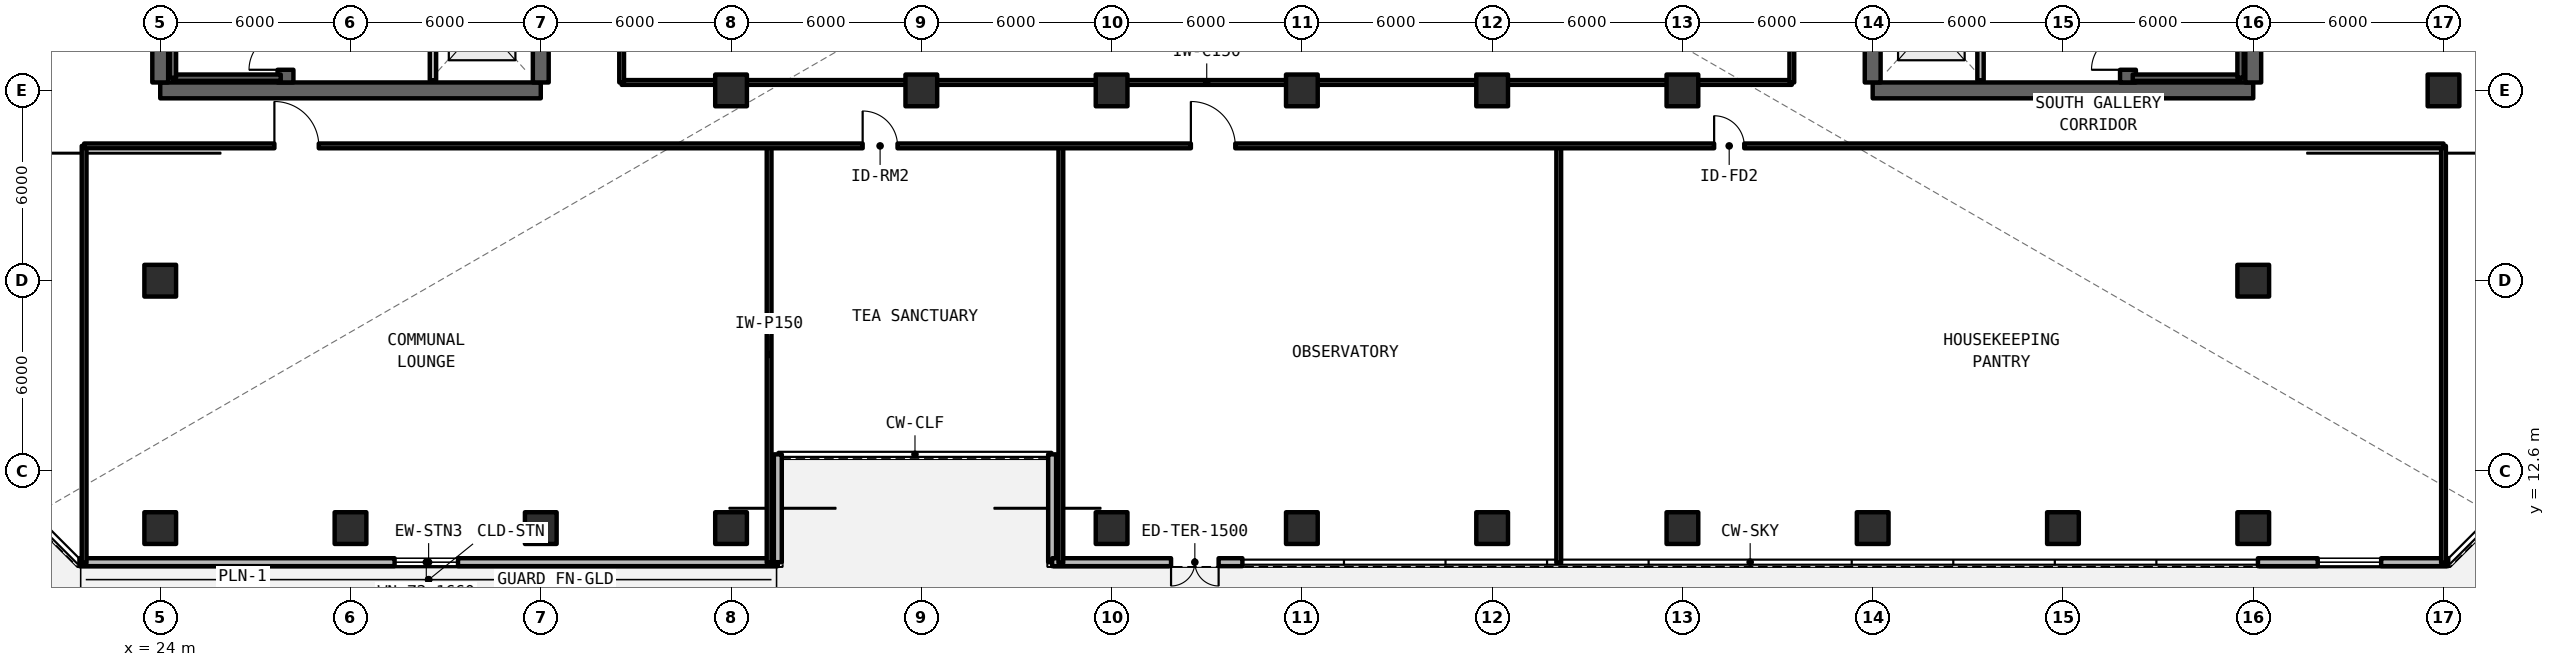
"""IFC4 building model, lengths in metres.
Left out: names, types, materials, properties, quantities, classifications, styles, units other than length and angle.
Written with IfcOpenShell. Run it as: python <this file> out.ifc"""

import sys

from ifc_helpers import new_model, si_unit, direction, frame, frame_2d, origin, origin_2d, place, context, subcontext, project, spatial, rectangle, extrude, element, fill, save


model = new_model("IFC4")
c1 = context("Model", 3, precision=1e-05, world=origin(), true_north=direction((0.0, 1.0)))
c2 = subcontext(c1, "Body", "Model", "MODEL_VIEW")
j1 = project(units=[si_unit("LENGTHUNIT", "METRE"), si_unit("PLANEANGLEUNIT", "RADIAN")], contexts=[c1])
p1 = place(None, origin())
s1 = spatial("IfcSite", under=j1, at=p1, CompositionType="ELEMENT")
p2 = place(p1, origin())
s2 = spatial("IfcBuilding", under=s1, at=p2, CompositionType="ELEMENT")
p3 = place(p2, frame((0.0, 0.0, 78.21)))
s3 = spatial("IfcBuildingStorey", under=s2, at=p3, CompositionType="ELEMENT", Elevation=78.21)
p4 = place(p3, frame((24.0, 24.6, 0.0), z_axis=(0.0, 0.0, 1.0), x_axis=(1.0, 0.0, 0.0)))
e1 = element("IfcWall", 1, at=p4, inside=s3, PredefinedType="SHEAR", context=c2, shape_type="SweptSolid", body=[
    extrude(rectangle(XDim=12.0, YDim=0.5, at=frame_2d((6.0, 0.0))), origin(), (0.0, 0.0, 1.0), 3.96),
])
p5 = place(p3, frame((24.0, 24.85, 0.0), z_axis=(0.0, 0.0, 1.0), x_axis=(0.0, 1.0, 0.0)))
e2 = element("IfcWall", 2, at=p5, inside=s3, PredefinedType="SHEAR", context=c2, shape_type="SweptSolid", body=[
    extrude(rectangle(XDim=17.5, YDim=0.5, at=frame_2d((8.75, 0.0))), origin(), (0.0, 0.0, 1.0), 3.96),
])
p6 = place(p3, frame((36.0, 24.85, 0.0), z_axis=(0.0, 0.0, 1.0), x_axis=(0.0, 1.0, 0.0)))
e3 = element("IfcWall", 3, at=p6, inside=s3, PredefinedType="SHEAR", context=c2, shape_type="SweptSolid", body=[
    extrude(rectangle(XDim=8.95, YDim=0.5, at=frame_2d((4.475, 0.0))), origin(), (0.0, 0.0, 1.0), 3.96),
])
p7 = place(p3, frame((27.95, 24.85, 0.0), z_axis=(0.0, 0.0, 1.0), x_axis=(0.0, 1.0, 0.0)))
e4 = element("IfcWall", 4, at=p7, inside=s3, PredefinedType="SHEAR", context=c2, shape_type="SweptSolid", body=[
    extrude(rectangle(XDim=17.5, YDim=0.5, at=frame_2d((8.75, 0.0))), origin(), (0.0, 0.0, 1.0), 3.96),
])
p8 = place(p7, frame((0.4, 0.0, 0.0)))
e5 = element("IfcOpeningElement", 5, at=p8, cuts=e4, PredefinedType="OPENING", context=c2, shape_type="SweptSolid", body=[
    extrude(rectangle(XDim=1.15, YDim=2.15, at=frame_2d((0.575, 1.075))), frame((0.0, 0.26, 0.0), z_axis=(0.0, -1.0, 0.0), x_axis=(1.0, 0.0, 0.0)), (0.0, 0.0, 1.0), 0.52),
])
p9 = place(p7, frame((9.6, 0.0, 0.0)))
e6 = element("IfcOpeningElement", 6, at=p9, cuts=e4, PredefinedType="OPENING", context=c2, shape_type="SweptSolid", body=[
    extrude(rectangle(XDim=1.15, YDim=2.15, at=frame_2d((0.575, 1.075))), frame((0.0, 0.26, 0.0), z_axis=(0.0, -1.0, 0.0), x_axis=(1.0, 0.0, 0.0)), (0.0, 0.0, 1.0), 0.52),
])
p10 = place(p3, frame((78.0, 24.6, 0.0), z_axis=(0.0, 0.0, 1.0), x_axis=(1.0, 0.0, 0.0)))
e7 = element("IfcWall", 7, at=p10, inside=s3, PredefinedType="SHEAR", context=c2, shape_type="SweptSolid", body=[
    extrude(rectangle(XDim=12.0, YDim=0.5, at=frame_2d((6.0, 0.0))), origin(), (0.0, 0.0, 1.0), 3.96),
])
p11 = place(p3, frame((90.0, 24.85, 0.0), z_axis=(0.0, 0.0, 1.0), x_axis=(0.0, 1.0, 0.0)))
e8 = element("IfcWall", 8, at=p11, inside=s3, PredefinedType="SHEAR", context=c2, shape_type="SweptSolid", body=[
    extrude(rectangle(XDim=17.5, YDim=0.5, at=frame_2d((8.75, 0.0))), origin(), (0.0, 0.0, 1.0), 3.96),
])
p12 = place(p3, frame((78.0, 24.85, 0.0), z_axis=(0.0, 0.0, 1.0), x_axis=(0.0, 1.0, 0.0)))
e9 = element("IfcWall", 9, at=p12, inside=s3, PredefinedType="SHEAR", context=c2, shape_type="SweptSolid", body=[
    extrude(rectangle(XDim=8.95, YDim=0.5, at=frame_2d((4.475, 0.0))), origin(), (0.0, 0.0, 1.0), 3.96),
])
p13 = place(p3, frame((86.05, 24.85, 0.0), z_axis=(0.0, 0.0, 1.0), x_axis=(0.0, 1.0, 0.0)))
e10 = element("IfcWall", 10, at=p13, inside=s3, PredefinedType="SHEAR", context=c2, shape_type="SweptSolid", body=[
    extrude(rectangle(XDim=17.5, YDim=0.5, at=frame_2d((8.75, 0.0))), origin(), (0.0, 0.0, 1.0), 3.96),
])
p14 = place(p13, frame((0.4, 0.0, 0.0)))
e11 = element("IfcOpeningElement", 11, at=p14, cuts=e10, PredefinedType="OPENING", context=c2, shape_type="SweptSolid", body=[
    extrude(rectangle(XDim=1.15, YDim=2.15, at=frame_2d((0.575, 1.075))), frame((0.0, 0.26, 0.0), z_axis=(0.0, -1.0, 0.0), x_axis=(1.0, 0.0, 0.0)), (0.0, 0.0, 1.0), 0.52),
])
p15 = place(p13, frame((9.6, 0.0, 0.0)))
e12 = element("IfcOpeningElement", 12, at=p15, cuts=e10, PredefinedType="OPENING", context=c2, shape_type="SweptSolid", body=[
    extrude(rectangle(XDim=1.15, YDim=2.15, at=frame_2d((0.575, 1.075))), frame((0.0, 0.26, 0.0), z_axis=(0.0, -1.0, 0.0), x_axis=(1.0, 0.0, 0.0)), (0.0, 0.0, 1.0), 0.52),
])
for number, where, z_axis, x_axis in (
    (13, (42.0, 24.6, 0.0), (0.0, 0.0, 1.0), (1.0, 0.0, 0.0)),
    (14, (48.0, 24.6, 0.0), (0.0, 0.0, 1.0), (1.0, 0.0, 0.0)),
    (15, (54.0, 24.6, 0.0), (0.0, 0.0, 1.0), (1.0, 0.0, 0.0)),
    (16, (60.0, 24.6, 0.0), (0.0, 0.0, 1.0), (1.0, 0.0, 0.0)),
    (17, (66.0, 24.6, 0.0), (0.0, 0.0, 1.0), (1.0, 0.0, 0.0)),
    (18, (72.0, 24.6, 0.0), (0.0, 0.0, 1.0), (1.0, 0.0, 0.0)),
    (19, (96.0, 24.6, 0.0), (0.0, 0.0, 1.0), (1.0, 0.0, 0.0)),
    (20, (24.0, 18.6, 0.0), (0.0, 0.0, 1.0), (1.0, 0.0, 0.0)),
    (21, (90.0, 18.6, 0.0), (0.0, 0.0, 1.0), (1.0, 0.0, 0.0)),
):
    element("IfcColumn", number, at=place(p3, frame(where, z_axis=z_axis, x_axis=x_axis)), inside=s3, PredefinedType="COLUMN", context=c2, shape_type="SweptSolid", body=[
        extrude(rectangle(XDim=1.0, YDim=1.0, at=origin_2d()), origin(), (0.0, 0.0, 1.0), 3.96),
    ])
for number, where, z_axis, x_axis in (
    (22, (24.0, 10.8, -0.28), (0.0, 0.0, 1.0), (1.0, 0.0, 0.0)),
    (23, (30.0, 10.8, -0.28), (0.0, 0.0, 1.0), (1.0, 0.0, 0.0)),
    (24, (36.0, 10.8, -0.28), (0.0, 0.0, 1.0), (1.0, 0.0, 0.0)),
    (25, (42.0, 10.8, -0.28), (0.0, 0.0, 1.0), (1.0, 0.0, 0.0)),
    (26, (54.0, 10.8, -0.28), (0.0, 0.0, 1.0), (1.0, 0.0, 0.0)),
    (27, (60.0, 10.8, -0.28), (0.0, 0.0, 1.0), (1.0, 0.0, 0.0)),
    (28, (66.0, 10.8, -0.28), (0.0, 0.0, 1.0), (1.0, 0.0, 0.0)),
    (29, (72.0, 10.8, -0.28), (0.0, 0.0, 1.0), (1.0, 0.0, 0.0)),
    (30, (78.0, 10.8, -0.28), (0.0, 0.0, 1.0), (1.0, 0.0, 0.0)),
    (31, (84.0, 10.8, -0.28), (0.0, 0.0, 1.0), (1.0, 0.0, 0.0)),
    (32, (90.0, 10.8, -0.28), (0.0, 0.0, 1.0), (1.0, 0.0, 0.0)),
):
    element("IfcColumn", number, at=place(p3, frame(where, z_axis=z_axis, x_axis=x_axis)), inside=s3, PredefinedType="COLUMN", context=c2, shape_type="SweptSolid", body=[
        extrude(rectangle(XDim=1.0, YDim=1.0, at=origin_2d()), origin(), (0.0, 0.0, 1.0), 4.24),
    ])
p16 = place(p3, frame((21.452, 9.725, 0.0), z_axis=(0.0, 0.0, 1.0), x_axis=(1.0, 0.0, 0.0)))
e33 = element("IfcWall", 33, at=p16, inside=s3, PredefinedType="SOLIDWALL", context=c2, shape_type="SweptSolid", body=[
    extrude(rectangle(XDim=22.023, YDim=0.25, at=frame_2d((11.012, 0.0))), origin(), (0.0, 0.0, 1.0), 3.74),
])
p17 = place(p16, frame((9.938, 0.0, 0.78)))
e34 = element("IfcOpeningElement", 34, at=p17, cuts=e33, PredefinedType="OPENING", context=c2, shape_type="SweptSolid", body=[
    extrude(rectangle(XDim=2.0, YDim=1.66, at=frame_2d((1.0, 0.83))), frame((0.0, 0.135, 0.0), z_axis=(0.0, -1.0, 0.0), x_axis=(1.0, 0.0, 0.0)), (0.0, 0.0, 1.0), 0.27),
])
for number, where, z_axis, x_axis in (
    (35, (43.475, 9.725, 0.0), (0.0, 0.0, 1.0), (0.0, 1.0, 0.0)),
    (36, (52.125, 13.125, 0.0), (0.0, 0.0, 1.0), (0.0, -1.0, 0.0)),
):
    element("IfcWall", number, at=place(p3, frame(where, z_axis=z_axis, x_axis=x_axis)), inside=s3, PredefinedType="SOLIDWALL", context=c2, shape_type="SweptSolid", body=[
        extrude(rectangle(XDim=3.4, YDim=0.25, at=frame_2d((1.7, 0.0))), origin(), (0.0, 0.0, 1.0), 3.74),
    ])
p18 = place(p3, frame((52.125, 9.725, 0.0), z_axis=(0.0, 0.0, 1.0), x_axis=(1.0, 0.0, 0.0)))
e37 = element("IfcWall", 37, at=p18, inside=s3, PredefinedType="SOLIDWALL", context=c2, shape_type="SweptSolid", body=[
    extrude(rectangle(XDim=6.0, YDim=0.25, at=frame_2d((3.0, 0.0))), origin(), (0.0, 0.0, 1.0), 3.74),
])
p19 = place(p18, frame((3.75, 0.0, 0.0)))
e38 = element("IfcOpeningElement", 38, at=p19, cuts=e37, PredefinedType="OPENING", context=c2, shape_type="SweptSolid", body=[
    extrude(rectangle(XDim=1.5, YDim=2.2, at=frame_2d((0.75, 1.1))), frame((0.0, 0.135, 0.0), z_axis=(0.0, -1.0, 0.0), x_axis=(1.0, 0.0, 0.0)), (0.0, 0.0, 1.0), 0.27),
])
p20 = place(p3, frame((90.148, 9.725, 0.0), z_axis=(0.0, 0.0, 1.0), x_axis=(1.0, 0.0, 0.0)))
e39 = element("IfcWall", 39, at=p20, inside=s3, PredefinedType="SOLIDWALL", context=c2, shape_type="SweptSolid", body=[
    extrude(rectangle(XDim=6.0, YDim=0.25, at=frame_2d((3.0, 0.0))), origin(), (0.0, 0.0, 1.0), 3.74),
])
p21 = place(p20, frame((1.886, 0.0, 0.78)))
e40 = element("IfcOpeningElement", 40, at=p21, cuts=e39, PredefinedType="OPENING", context=c2, shape_type="SweptSolid", body=[
    extrude(rectangle(XDim=2.0, YDim=1.66, at=frame_2d((1.0, 0.83))), frame((0.0, 0.135, 0.0), z_axis=(0.0, -1.0, 0.0), x_axis=(1.0, 0.0, 0.0)), (0.0, 0.0, 1.0), 0.27),
])
p22 = place(p3, frame((32.6, 24.92, 0.0), z_axis=(0.0, 0.0, 1.0), x_axis=(0.0, 1.0, 0.0)))
e41 = element("IfcWall", 41, at=p22, inside=s3, PredefinedType="SOLIDWALL", context=c2, shape_type="SweptSolid", body=[
    extrude(rectangle(XDim=3.58, YDim=0.2, at=frame_2d((1.79, 0.0))), origin(), (0.0, 0.0, 1.0), 2.96),
])
p23 = place(p22, frame((1.3, 0.0, 0.0)))
e42 = element("IfcOpeningElement", 42, at=p23, cuts=e41, PredefinedType="OPENING", context=c2, shape_type="SweptSolid", body=[
    extrude(rectangle(XDim=1.1, YDim=2.2, at=frame_2d((0.55, 1.1))), frame((0.0, 0.11, 0.0), z_axis=(0.0, -1.0, 0.0), x_axis=(1.0, 0.0, 0.0)), (0.0, 0.0, 1.0), 0.22),
])
p24 = place(p3, frame((81.4, 24.92, 0.0), z_axis=(0.0, 0.0, 1.0), x_axis=(0.0, 1.0, 0.0)))
e43 = element("IfcWall", 43, at=p24, inside=s3, PredefinedType="SOLIDWALL", context=c2, shape_type="SweptSolid", body=[
    extrude(rectangle(XDim=3.58, YDim=0.2, at=frame_2d((1.79, 0.0))), origin(), (0.0, 0.0, 1.0), 2.96),
])
p25 = place(p24, frame((1.3, 0.0, 0.0)))
e44 = element("IfcOpeningElement", 44, at=p25, cuts=e43, PredefinedType="OPENING", context=c2, shape_type="SweptSolid", body=[
    extrude(rectangle(XDim=1.1, YDim=2.2, at=frame_2d((0.55, 1.1))), frame((0.0, 0.11, 0.0), z_axis=(0.0, -1.0, 0.0), x_axis=(1.0, 0.0, 0.0)), (0.0, 0.0, 1.0), 0.22),
])
p26 = place(p3, frame((38.55, 24.85, 0.0), z_axis=(0.0, 0.0, 1.0), x_axis=(1.0, 0.0, 0.0)))
e45 = element("IfcWall", 45, at=p26, inside=s3, PredefinedType="SOLIDWALL", context=c2, shape_type="SweptSolid", body=[
    extrude(rectangle(XDim=36.9, YDim=0.15, at=frame_2d((18.45, 0.0))), origin(), (0.0, 0.0, 1.0), 2.96),
])
p27 = place(p3, frame((38.55, 24.85, 0.0), z_axis=(0.0, 0.0, 1.0), x_axis=(0.0, 1.0, 0.0)))
e46 = element("IfcWall", 46, at=p27, inside=s3, PredefinedType="SOLIDWALL", context=c2, shape_type="SweptSolid", body=[
    extrude(rectangle(XDim=17.5, YDim=0.15, at=frame_2d((8.75, 0.0))), origin(), (0.0, 0.0, 1.0), 2.96),
])
p28 = place(p27, frame((7.8, 0.0, 0.0)))
e47 = element("IfcOpeningElement", 47, at=p28, cuts=e46, PredefinedType="OPENING", context=c2, shape_type="SweptSolid", body=[
    extrude(rectangle(XDim=1.4, YDim=2.15, at=frame_2d((0.7, 1.075))), frame((0.0, 0.085, 0.0), z_axis=(0.0, -1.0, 0.0), x_axis=(1.0, 0.0, 0.0)), (0.0, 0.0, 1.0), 0.17),
])
p29 = place(p3, frame((75.45, 24.85, 0.0), z_axis=(0.0, 0.0, 1.0), x_axis=(0.0, 1.0, 0.0)))
e48 = element("IfcWall", 48, at=p29, inside=s3, PredefinedType="SOLIDWALL", context=c2, shape_type="SweptSolid", body=[
    extrude(rectangle(XDim=17.5, YDim=0.15, at=frame_2d((8.75, 0.0))), origin(), (0.0, 0.0, 1.0), 2.96),
])
p30 = place(p3, frame((21.6, 9.7, 0.0), z_axis=(0.0, 0.0, 1.0), x_axis=(0.0, 1.0, 0.0)))
e49 = element("IfcWall", 49, at=p30, inside=s3, PredefinedType="SOLIDWALL", context=c2, shape_type="SweptSolid", body=[
    extrude(rectangle(XDim=13.15, YDim=0.15, at=frame_2d((6.575, 0.0))), origin(), (0.0, 0.0, 1.0), 2.96),
])
for number, where, z_axis, x_axis in (
    (50, (43.2, 9.7, 0.0), (0.0, 0.0, 1.0), (0.0, 1.0, 0.0)),
    (51, (52.4, 9.7, 0.0), (0.0, 0.0, 1.0), (0.0, 1.0, 0.0)),
    (52, (68.1, 9.7, 0.0), (0.0, 0.0, 1.0), (0.0, 1.0, 0.0)),
):
    element("IfcWall", number, at=place(p3, frame(where, z_axis=z_axis, x_axis=x_axis)), inside=s3, PredefinedType="PARTITIONING", context=c2, shape_type="SweptSolid", body=[
        extrude(rectangle(XDim=13.15, YDim=0.15, at=frame_2d((6.575, 0.0))), origin(), (0.0, 0.0, 1.0), 2.96),
    ])
p31 = place(p3, frame((96.0, 9.7, 0.0), z_axis=(0.0, 0.0, 1.0), x_axis=(0.0, 1.0, 0.0)))
e53 = element("IfcWall", 53, at=p31, inside=s3, PredefinedType="SOLIDWALL", context=c2, shape_type="SweptSolid", body=[
    extrude(rectangle(XDim=13.15, YDim=0.15, at=frame_2d((6.575, 0.0))), origin(), (0.0, 0.0, 1.0), 2.96),
])
p32 = place(p3, frame((21.6, 22.85, 0.0), z_axis=(0.0, 0.0, 1.0), x_axis=(1.0, 0.0, 0.0)))
e54 = element("IfcWall", 54, at=p32, inside=s3, PredefinedType="SOLIDWALL", context=c2, shape_type="SweptSolid", body=[
    extrude(rectangle(XDim=74.4, YDim=0.15, at=frame_2d((37.2, 0.0))), origin(), (0.0, 0.0, 1.0), 2.96),
])
p33 = place(p32, frame((6.0, 0.0, 0.0)))
e55 = element("IfcOpeningElement", 55, at=p33, cuts=e54, PredefinedType="OPENING", context=c2, shape_type="SweptSolid", body=[
    extrude(rectangle(XDim=1.4, YDim=2.15, at=frame_2d((0.7, 1.075))), frame((0.0, 0.085, 0.0), z_axis=(0.0, -1.0, 0.0), x_axis=(1.0, 0.0, 0.0)), (0.0, 0.0, 1.0), 0.17),
])
p34 = place(p32, frame((24.55, 0.0, 0.0)))
e56 = element("IfcOpeningElement", 56, at=p34, cuts=e54, PredefinedType="OPENING", context=c2, shape_type="SweptSolid", body=[
    extrude(rectangle(XDim=1.1, YDim=2.15, at=frame_2d((0.55, 1.075))), frame((0.0, 0.085, 0.0), z_axis=(0.0, -1.0, 0.0), x_axis=(1.0, 0.0, 0.0)), (0.0, 0.0, 1.0), 0.17),
])
p35 = place(p32, frame((34.9, 0.0, 0.0)))
e57 = element("IfcOpeningElement", 57, at=p35, cuts=e54, PredefinedType="OPENING", context=c2, shape_type="SweptSolid", body=[
    extrude(rectangle(XDim=1.4, YDim=2.15, at=frame_2d((0.7, 1.075))), frame((0.0, 0.085, 0.0), z_axis=(0.0, -1.0, 0.0), x_axis=(1.0, 0.0, 0.0)), (0.0, 0.0, 1.0), 0.17),
])
p36 = place(p32, frame((51.4, 0.0, 0.0)))
e58 = element("IfcOpeningElement", 58, at=p36, cuts=e54, PredefinedType="OPENING", context=c2, shape_type="SweptSolid", body=[
    extrude(rectangle(XDim=0.95, YDim=2.15, at=frame_2d((0.475, 1.075))), frame((0.0, 0.085, 0.0), z_axis=(0.0, -1.0, 0.0), x_axis=(1.0, 0.0, 0.0)), (0.0, 0.0, 1.0), 0.17),
])
p37 = place(p3, frame((24.4, 25.0, 0.0), z_axis=(0.0, 0.0, 1.0), x_axis=(1.0, 0.0, 0.0)))
e59 = element("IfcWall", 59, at=p37, inside=s3, PredefinedType="SOLIDWALL", context=c2, shape_type="SweptSolid", body=[
    extrude(rectangle(XDim=3.4, YDim=0.2, at=frame_2d((1.7, 0.0))), origin(), (0.0, 0.0, 1.0), 3.96),
])
p38 = place(p3, frame((24.4, 33.0, 0.0), z_axis=(0.0, 0.0, 1.0), x_axis=(0.0, -1.0, 0.0)))
e60 = element("IfcWall", 60, at=p38, inside=s3, PredefinedType="SOLIDWALL", context=c2, shape_type="SweptSolid", body=[
    extrude(rectangle(XDim=8.0, YDim=0.2, at=frame_2d((4.0, 0.0))), origin(), (0.0, 0.0, 1.0), 3.96),
])
p39 = place(p3, frame((86.2, 25.0, 0.0), z_axis=(0.0, 0.0, 1.0), x_axis=(1.0, 0.0, 0.0)))
e61 = element("IfcWall", 61, at=p39, inside=s3, PredefinedType="SOLIDWALL", context=c2, shape_type="SweptSolid", body=[
    extrude(rectangle(XDim=3.4, YDim=0.2, at=frame_2d((1.7, 0.0))), origin(), (0.0, 0.0, 1.0), 3.96),
])
p40 = place(p3, frame((89.6, 25.0, 0.0), z_axis=(0.0, 0.0, 1.0), x_axis=(0.0, 1.0, 0.0)))
e62 = element("IfcWall", 62, at=p40, inside=s3, PredefinedType="SOLIDWALL", context=c2, shape_type="SweptSolid", body=[
    extrude(rectangle(XDim=8.0, YDim=0.2, at=frame_2d((4.0, 0.0))), origin(), (0.0, 0.0, 1.0), 3.96),
])
p41 = place(p17, origin())
e63 = element("IfcWindow", 63, at=p41, inside=s3, PartitioningType="SINGLE_PANEL", PredefinedType="WINDOW", context=c2, shape_type="SweptSolid", body=[
    extrude(rectangle(XDim=2.0, YDim=1.66, at=frame_2d((1.0, 0.83))), frame((0.0, 0.03, 0.0), z_axis=(0.0, -1.0, 0.0), x_axis=(1.0, 0.0, 0.0)), (0.0, 0.0, 1.0), 0.06),
])
fill(e34, e63)
p42 = place(p19, frame((1.5, 0.0, 0.0), z_axis=(0.0, 0.0, 1.0), x_axis=(-1.0, 0.0, 0.0)))
e64 = element("IfcDoor", 64, at=p42, inside=s3, OperationType="SINGLE_SWING_RIGHT", PredefinedType="DOOR", context=c2, shape_type="SweptSolid", body=[
    extrude(rectangle(XDim=1.5, YDim=2.2, at=frame_2d((0.75, 1.1))), frame((0.0, 0.025, 0.0), z_axis=(0.0, -1.0, 0.0), x_axis=(1.0, 0.0, 0.0)), (0.0, 0.0, 1.0), 0.05),
])
fill(e38, e64)
p43 = place(p21, origin())
e65 = element("IfcWindow", 65, at=p43, inside=s3, PartitioningType="SINGLE_PANEL", PredefinedType="WINDOW", context=c2, shape_type="SweptSolid", body=[
    extrude(rectangle(XDim=2.0, YDim=1.66, at=frame_2d((1.0, 0.83))), frame((0.0, 0.03, 0.0), z_axis=(0.0, -1.0, 0.0), x_axis=(1.0, 0.0, 0.0)), (0.0, 0.0, 1.0), 0.06),
])
fill(e40, e65)
p44 = place(p33, origin())
e66 = element("IfcDoor", 66, at=p44, inside=s3, OperationType="SINGLE_SWING_RIGHT", PredefinedType="DOOR", context=c2, shape_type="SweptSolid", body=[
    extrude(rectangle(XDim=1.4, YDim=2.15, at=frame_2d((0.7, 1.075))), frame((0.0, 0.025, 0.0), z_axis=(0.0, -1.0, 0.0), x_axis=(1.0, 0.0, 0.0)), (0.0, 0.0, 1.0), 0.05),
])
fill(e55, e66)
p45 = place(p34, origin())
e67 = element("IfcDoor", 67, at=p45, inside=s3, OperationType="SINGLE_SWING_LEFT", PredefinedType="DOOR", context=c2, shape_type="SweptSolid", body=[
    extrude(rectangle(XDim=1.1, YDim=2.15, at=frame_2d((0.55, 1.075))), frame((0.0, 0.025, 0.0), z_axis=(0.0, -1.0, 0.0), x_axis=(1.0, 0.0, 0.0)), (0.0, 0.0, 1.0), 0.05),
])
fill(e56, e67)
p46 = place(p35, origin())
e68 = element("IfcDoor", 68, at=p46, inside=s3, OperationType="SINGLE_SWING_RIGHT", PredefinedType="DOOR", context=c2, shape_type="SweptSolid", body=[
    extrude(rectangle(XDim=1.4, YDim=2.15, at=frame_2d((0.7, 1.075))), frame((0.0, 0.025, 0.0), z_axis=(0.0, -1.0, 0.0), x_axis=(1.0, 0.0, 0.0)), (0.0, 0.0, 1.0), 0.05),
])
fill(e57, e68)
p47 = place(p36, origin())
e69 = element("IfcDoor", 69, at=p47, inside=s3, OperationType="SINGLE_SWING_LEFT", PredefinedType="DOOR", context=c2, shape_type="SweptSolid", body=[
    extrude(rectangle(XDim=0.95, YDim=2.15, at=frame_2d((0.475, 1.075))), frame((0.0, 0.025, 0.0), z_axis=(0.0, -1.0, 0.0), x_axis=(1.0, 0.0, 0.0)), (0.0, 0.0, 1.0), 0.05),
])
fill(e58, e69)
p48 = place(p8, origin())
e70 = element("IfcDoor", 70, at=p48, inside=s3, OperationType="SINGLE_SWING_LEFT", PredefinedType="DOOR", context=c2, shape_type="SweptSolid", body=[
    extrude(rectangle(XDim=1.15, YDim=2.15, at=frame_2d((0.575, 1.075))), frame((0.0, 0.025, 0.0), z_axis=(0.0, -1.0, 0.0), x_axis=(1.0, 0.0, 0.0)), (0.0, 0.0, 1.0), 0.05),
])
fill(e5, e70)
p49 = place(p14, origin())
e71 = element("IfcDoor", 71, at=p49, inside=s3, OperationType="SINGLE_SWING_LEFT", PredefinedType="DOOR", context=c2, shape_type="SweptSolid", body=[
    extrude(rectangle(XDim=1.15, YDim=2.15, at=frame_2d((0.575, 1.075))), frame((0.0, 0.025, 0.0), z_axis=(0.0, -1.0, 0.0), x_axis=(1.0, 0.0, 0.0)), (0.0, 0.0, 1.0), 0.05),
])
fill(e11, e71)
save(model, sys.argv[1])
